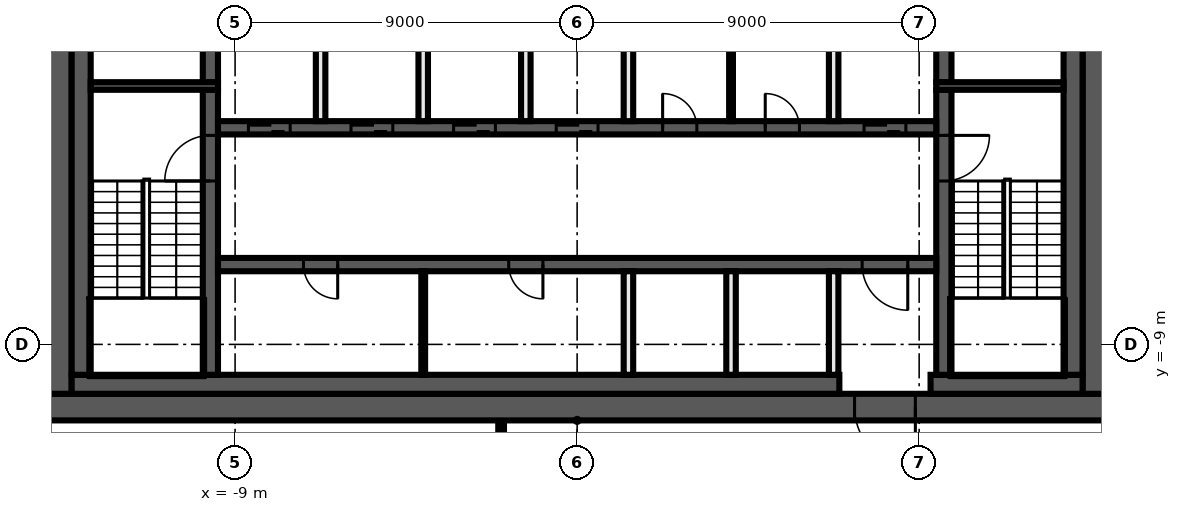
"""IFC4 building model, lengths in metres.
Left out: names, types, materials, properties, quantities, classifications, styles, units other than length and angle.
Written with IfcOpenShell. Run it as: python <this file> out.ifc"""

import sys

from ifc_helpers import new_model, si_unit, direction, frame, frame_2d, origin, place, context, subcontext, project, spatial, rectangle, extrude, element, fill, save


model = new_model("IFC4")
c1 = context("Model", 3, precision=1e-05, world=origin(), true_north=direction((0.0, 1.0)))
c2 = subcontext(c1, "Body", "Model", "MODEL_VIEW")
j1 = project(units=[si_unit("LENGTHUNIT", "METRE"), si_unit("PLANEANGLEUNIT", "RADIAN")], contexts=[c1])
p1 = place(None, origin())
s1 = spatial("IfcSite", under=j1, at=p1, CompositionType="ELEMENT")
p2 = place(p1, origin())
s2 = spatial("IfcBuilding", under=s1, at=p2, CompositionType="ELEMENT")
p3 = place(p2, frame((0.0, 0.0, 232.8)))
s3 = spatial("IfcBuildingStorey", under=s2, at=p3, CompositionType="ELEMENT", Elevation=232.8)
p4 = place(p3, frame((-2.0, -13.325, 0.0), z_axis=(0.0, 0.0, 1.0), x_axis=(0.0, 1.0, 0.0)))
e1 = element("IfcWall", 1, at=p4, inside=s3, PredefinedType="PARTITIONING", context=c2, shape_type="SweptSolid", body=[
    extrude(rectangle(XDim=2.325, YDim=0.15, at=frame_2d((1.163, 0.0))), origin(), (0.0, 0.0, 1.0), 3.75),
])
p5 = place(p3, frame((14.0, -10.65, 0.0), z_axis=(0.0, 0.0, 1.0), x_axis=(-1.0, 0.0, 0.0)))
e2 = element("IfcWall", 2, at=p5, inside=s3, PredefinedType="SHEAR", context=c2, shape_type="SweptSolid", body=[
    extrude(rectangle(XDim=28.0, YDim=0.7, at=frame_2d((14.0, 0.0))), origin(), (0.0, 0.0, 1.0), 3.75),
])
p6 = place(p5, frame((5.1, 0.0, 0.0)))
e3 = element("IfcOpeningElement", 3, at=p6, cuts=e2, PredefinedType="OPENING", context=c2, shape_type="SweptSolid", body=[
    extrude(rectangle(XDim=1.6, YDim=2.1, at=frame_2d((0.8, 1.05))), frame((0.0, 0.36, 0.0), z_axis=(0.0, -1.0, 0.0), x_axis=(1.0, 0.0, 0.0)), (0.0, 0.0, 1.0), 0.72),
])
for number, where, z_axis, x_axis in (
    (4, (13.65, 10.3, 0.0), (0.0, 0.0, 1.0), (0.0, -1.0, 0.0)),
    (5, (-13.65, -10.3, 0.0), (0.0, 0.0, 1.0), (0.0, 1.0, 0.0)),
):
    element("IfcWall", number, at=place(p3, frame(where, z_axis=z_axis, x_axis=x_axis)), inside=s3, PredefinedType="SHEAR", context=c2, shape_type="SweptSolid", body=[
        extrude(rectangle(XDim=20.6, YDim=0.7, at=frame_2d((10.3, 0.0))), origin(), (0.0, 0.0, 1.0), 3.75),
    ])
p7 = place(p3, frame((13.3, -10.05, 0.0), z_axis=(0.0, 0.0, 1.0), x_axis=(-1.0, 0.0, 0.0)))
e6 = element("IfcWall", 6, at=p7, inside=s3, PredefinedType="SHEAR", context=c2, shape_type="SweptSolid", body=[
    extrude(rectangle(XDim=4.0, YDim=0.5, at=frame_2d((2.0, 0.0))), origin(), (0.0, 0.0, 1.0), 3.75),
])
p8 = place(p3, frame((6.9, -10.05, 0.0), z_axis=(0.0, 0.0, 1.0), x_axis=(-1.0, 0.0, 0.0)))
e7 = element("IfcWall", 7, at=p8, inside=s3, PredefinedType="SHEAR", context=c2, shape_type="SweptSolid", body=[
    extrude(rectangle(XDim=20.2, YDim=0.5, at=frame_2d((10.1, 0.0))), origin(), (0.0, 0.0, 1.0), 3.75),
])
for number, where, z_axis, x_axis in (
    (8, (13.05, 9.8, 0.0), (0.0, 0.0, 1.0), (0.0, -1.0, 0.0)),
    (9, (-13.05, -9.8, 0.0), (0.0, 0.0, 1.0), (0.0, 1.0, 0.0)),
):
    element("IfcWall", number, at=place(p3, frame(where, z_axis=z_axis, x_axis=x_axis)), inside=s3, PredefinedType="SHEAR", context=c2, shape_type="SweptSolid", body=[
        extrude(rectangle(XDim=19.6, YDim=0.5, at=frame_2d((9.8, 0.0))), origin(), (0.0, 0.0, 1.0), 3.75),
    ])
p9 = place(p3, frame((9.65, -2.3, 0.0), z_axis=(0.0, 0.0, 1.0), x_axis=(0.0, -1.0, 0.0)))
e10 = element("IfcWall", 10, at=p9, inside=s3, PredefinedType="SHEAR", context=c2, shape_type="SweptSolid", body=[
    extrude(rectangle(XDim=7.5, YDim=0.4, at=frame_2d((3.75, 0.0))), origin(), (0.0, 0.0, 1.0), 3.75),
])
p10 = place(p9, frame((1.2, 0.0, 0.0)))
e11 = element("IfcOpeningElement", 11, at=p10, cuts=e10, PredefinedType="OPENING", context=c2, shape_type="SweptSolid", body=[
    extrude(rectangle(XDim=1.2, YDim=2.1, at=frame_2d((0.6, 1.05))), frame((0.0, 0.21, 0.0), z_axis=(0.0, -1.0, 0.0), x_axis=(1.0, 0.0, 0.0)), (0.0, 0.0, 1.0), 0.42),
])
p11 = place(p3, frame((9.65, 2.1, 0.0), z_axis=(0.0, 0.0, 1.0), x_axis=(0.0, -1.0, 0.0)))
e12 = element("IfcWall", 12, at=p11, inside=s3, PredefinedType="SHEAR", context=c2, shape_type="SweptSolid", body=[
    extrude(rectangle(XDim=4.2, YDim=0.4, at=frame_2d((2.1, 0.0))), origin(), (0.0, 0.0, 1.0), 3.75),
])
p12 = place(p11, frame((0.15, 0.0, 0.0)))
e13 = element("IfcOpeningElement", 13, at=p12, cuts=e12, PredefinedType="OPENING", context=c2, shape_type="SweptSolid", body=[
    extrude(rectangle(XDim=0.9, YDim=2.1, at=frame_2d((0.45, 1.05))), frame((0.0, 0.21, 0.0), z_axis=(0.0, -1.0, 0.0), x_axis=(1.0, 0.0, 0.0)), (0.0, 0.0, 1.0), 0.42),
])
p13 = place(p3, frame((-9.65, -9.8, 0.0), z_axis=(0.0, 0.0, 1.0), x_axis=(0.0, 1.0, 0.0)))
e14 = element("IfcWall", 14, at=p13, inside=s3, PredefinedType="SHEAR", context=c2, shape_type="SweptSolid", body=[
    extrude(rectangle(XDim=7.5, YDim=0.4, at=frame_2d((3.75, 0.0))), origin(), (0.0, 0.0, 1.0), 3.75),
])
p14 = place(p13, frame((5.1, 0.0, 0.0)))
e15 = element("IfcOpeningElement", 15, at=p14, cuts=e14, PredefinedType="OPENING", context=c2, shape_type="SweptSolid", body=[
    extrude(rectangle(XDim=1.2, YDim=2.1, at=frame_2d((0.6, 1.05))), frame((0.0, 0.21, 0.0), z_axis=(0.0, -1.0, 0.0), x_axis=(1.0, 0.0, 0.0)), (0.0, 0.0, 1.0), 0.42),
])
p15 = place(p3, frame((-9.65, -2.1, 0.0), z_axis=(0.0, 0.0, 1.0), x_axis=(0.0, 1.0, 0.0)))
e16 = element("IfcWall", 16, at=p15, inside=s3, PredefinedType="SHEAR", context=c2, shape_type="SweptSolid", body=[
    extrude(rectangle(XDim=4.2, YDim=0.4, at=frame_2d((2.1, 0.0))), origin(), (0.0, 0.0, 1.0), 3.75),
])
for number, where, z_axis, x_axis in (
    (17, (9.45, -2.2, 0.0), (0.0, 0.0, 1.0), (1.0, 0.0, 0.0)),
    (18, (-9.45, -2.2, 0.0), (0.0, 0.0, 1.0), (-1.0, 0.0, 0.0)),
):
    element("IfcWall", number, at=place(p3, frame(where, z_axis=z_axis, x_axis=x_axis)), inside=s3, PredefinedType="SHEAR", context=c2, shape_type="SweptSolid", body=[
        extrude(rectangle(XDim=3.35, YDim=0.2, at=frame_2d((1.675, 0.0))), origin(), (0.0, 0.0, 1.0), 3.75),
    ])
p16 = place(p3, frame((-9.45, -3.3, 0.0), z_axis=(0.0, 0.0, 1.0), x_axis=(1.0, 0.0, 0.0)))
e19 = element("IfcWall", 19, at=p16, inside=s3, PredefinedType="SHEAR", context=c2, shape_type="SweptSolid", body=[
    extrude(rectangle(XDim=18.9, YDim=0.35, at=frame_2d((9.45, 0.0))), origin(), (0.0, 0.0, 1.0), 3.75),
])
p17 = place(p16, frame((0.8, 0.0, 0.0)))
e20 = element("IfcOpeningElement", 20, at=p17, cuts=e19, PredefinedType="OPENING", context=c2, shape_type="SweptSolid", body=[
    extrude(rectangle(XDim=1.1, YDim=2.1, at=frame_2d((0.55, 1.05))), frame((0.0, 0.185, 0.0), z_axis=(0.0, -1.0, 0.0), x_axis=(1.0, 0.0, 0.0)), (0.0, 0.0, 1.0), 0.37),
])
p18 = place(p16, frame((3.5, 0.0, 0.0)))
e21 = element("IfcOpeningElement", 21, at=p18, cuts=e19, PredefinedType="OPENING", context=c2, shape_type="SweptSolid", body=[
    extrude(rectangle(XDim=1.1, YDim=2.1, at=frame_2d((0.55, 1.05))), frame((0.0, 0.185, 0.0), z_axis=(0.0, -1.0, 0.0), x_axis=(1.0, 0.0, 0.0)), (0.0, 0.0, 1.0), 0.37),
])
p19 = place(p16, frame((6.2, 0.0, 0.0)))
e22 = element("IfcOpeningElement", 22, at=p19, cuts=e19, PredefinedType="OPENING", context=c2, shape_type="SweptSolid", body=[
    extrude(rectangle(XDim=1.1, YDim=2.1, at=frame_2d((0.55, 1.05))), frame((0.0, 0.185, 0.0), z_axis=(0.0, -1.0, 0.0), x_axis=(1.0, 0.0, 0.0)), (0.0, 0.0, 1.0), 0.37),
])
p20 = place(p16, frame((8.9, 0.0, 0.0)))
e23 = element("IfcOpeningElement", 23, at=p20, cuts=e19, PredefinedType="OPENING", context=c2, shape_type="SweptSolid", body=[
    extrude(rectangle(XDim=1.1, YDim=2.1, at=frame_2d((0.55, 1.05))), frame((0.0, 0.185, 0.0), z_axis=(0.0, -1.0, 0.0), x_axis=(1.0, 0.0, 0.0)), (0.0, 0.0, 1.0), 0.37),
])
p21 = place(p16, frame((17.0, 0.0, 0.0)))
e24 = element("IfcOpeningElement", 24, at=p21, cuts=e19, PredefinedType="OPENING", context=c2, shape_type="SweptSolid", body=[
    extrude(rectangle(XDim=1.1, YDim=2.1, at=frame_2d((0.55, 1.05))), frame((0.0, 0.185, 0.0), z_axis=(0.0, -1.0, 0.0), x_axis=(1.0, 0.0, 0.0)), (0.0, 0.0, 1.0), 0.37),
])
p22 = place(p16, frame((11.7, 0.0, 0.0)))
e25 = element("IfcOpeningElement", 25, at=p22, cuts=e19, PredefinedType="OPENING", context=c2, shape_type="SweptSolid", body=[
    extrude(rectangle(XDim=0.9, YDim=2.1, at=frame_2d((0.45, 1.05))), frame((0.0, 0.185, 0.0), z_axis=(0.0, -1.0, 0.0), x_axis=(1.0, 0.0, 0.0)), (0.0, 0.0, 1.0), 0.37),
])
p23 = place(p16, frame((14.4, 0.0, 0.0)))
e26 = element("IfcOpeningElement", 26, at=p23, cuts=e19, PredefinedType="OPENING", context=c2, shape_type="SweptSolid", body=[
    extrude(rectangle(XDim=0.9, YDim=2.1, at=frame_2d((0.45, 1.05))), frame((0.0, 0.185, 0.0), z_axis=(0.0, -1.0, 0.0), x_axis=(1.0, 0.0, 0.0)), (0.0, 0.0, 1.0), 0.37),
])
p24 = place(p3, frame((9.45, -6.9, 0.0), z_axis=(0.0, 0.0, 1.0), x_axis=(-1.0, 0.0, 0.0)))
e27 = element("IfcWall", 27, at=p24, inside=s3, PredefinedType="SHEAR", context=c2, shape_type="SweptSolid", body=[
    extrude(rectangle(XDim=18.9, YDim=0.35, at=frame_2d((9.45, 0.0))), origin(), (0.0, 0.0, 1.0), 3.75),
])
p25 = place(p24, frame((0.75, 0.0, 0.0)))
e28 = element("IfcOpeningElement", 28, at=p25, cuts=e27, PredefinedType="OPENING", context=c2, shape_type="SweptSolid", body=[
    extrude(rectangle(XDim=1.2, YDim=2.1, at=frame_2d((0.6, 1.05))), frame((0.0, 0.185, 0.0), z_axis=(0.0, -1.0, 0.0), x_axis=(1.0, 0.0, 0.0)), (0.0, 0.0, 1.0), 0.37),
])
p26 = place(p24, frame((15.75, 0.0, 0.0)))
e29 = element("IfcOpeningElement", 29, at=p26, cuts=e27, PredefinedType="OPENING", context=c2, shape_type="SweptSolid", body=[
    extrude(rectangle(XDim=0.9, YDim=2.1, at=frame_2d((0.45, 1.05))), frame((0.0, 0.185, 0.0), z_axis=(0.0, -1.0, 0.0), x_axis=(1.0, 0.0, 0.0)), (0.0, 0.0, 1.0), 0.37),
])
p27 = place(p24, frame((10.35, 0.0, 0.0)))
e30 = element("IfcOpeningElement", 30, at=p27, cuts=e27, PredefinedType="OPENING", context=c2, shape_type="SweptSolid", body=[
    extrude(rectangle(XDim=0.9, YDim=2.1, at=frame_2d((0.45, 1.05))), frame((0.0, 0.185, 0.0), z_axis=(0.0, -1.0, 0.0), x_axis=(1.0, 0.0, 0.0)), (0.0, 0.0, 1.0), 0.37),
])
for number, where, z_axis, x_axis in (
    (31, (6.75, -9.8, 0.0), (0.0, 0.0, 1.0), (0.0, 1.0, 0.0)),
    (32, (6.75, -3.125, 0.0), (0.0, 0.0, 1.0), (0.0, 1.0, 0.0)),
):
    element("IfcWall", number, at=place(p3, frame(where, z_axis=z_axis, x_axis=x_axis)), inside=s3, PredefinedType="SOLIDWALL", context=c2, shape_type="SweptSolid", body=[
        extrude(rectangle(XDim=2.725, YDim=0.25, at=frame_2d((1.363, 0.0))), origin(), (0.0, 0.0, 1.0), 3.75),
    ])
p28 = place(p3, frame((4.05, -3.125, 0.0), z_axis=(0.0, 0.0, 1.0), x_axis=(0.0, 1.0, 0.0)))
e33 = element("IfcWall", 33, at=p28, inside=s3, PredefinedType="PARTITIONING", context=c2, shape_type="SweptSolid", body=[
    extrude(rectangle(XDim=2.725, YDim=0.1, at=frame_2d((1.363, 0.0))), origin(), (0.0, 0.0, 1.0), 3.75),
])
for number, where, z_axis, x_axis in (
    (34, (4.05, -9.8, 0.0), (0.0, 0.0, 1.0), (0.0, 1.0, 0.0)),
    (35, (1.35, -9.8, 0.0), (0.0, 0.0, 1.0), (0.0, 1.0, 0.0)),
    (36, (1.35, -3.125, 0.0), (0.0, 0.0, 1.0), (0.0, 1.0, 0.0)),
    (37, (-1.35, -3.125, 0.0), (0.0, 0.0, 1.0), (0.0, 1.0, 0.0)),
):
    element("IfcWall", number, at=place(p3, frame(where, z_axis=z_axis, x_axis=x_axis)), inside=s3, PredefinedType="SOLIDWALL", context=c2, shape_type="SweptSolid", body=[
        extrude(rectangle(XDim=2.725, YDim=0.25, at=frame_2d((1.363, 0.0))), origin(), (0.0, 0.0, 1.0), 3.75),
    ])
p29 = place(p3, frame((-4.05, -9.8, 0.0), z_axis=(0.0, 0.0, 1.0), x_axis=(0.0, 1.0, 0.0)))
e38 = element("IfcWall", 38, at=p29, inside=s3, PredefinedType="PARTITIONING", context=c2, shape_type="SweptSolid", body=[
    extrude(rectangle(XDim=2.725, YDim=0.1, at=frame_2d((1.363, 0.0))), origin(), (0.0, 0.0, 1.0), 3.75),
])
for number, where, z_axis, x_axis in (
    (39, (-4.05, -3.125, 0.0), (0.0, 0.0, 1.0), (0.0, 1.0, 0.0)),
    (40, (-6.75, -3.125, 0.0), (0.0, 0.0, 1.0), (0.0, 1.0, 0.0)),
):
    element("IfcWall", number, at=place(p3, frame(where, z_axis=z_axis, x_axis=x_axis)), inside=s3, PredefinedType="SOLIDWALL", context=c2, shape_type="SweptSolid", body=[
        extrude(rectangle(XDim=2.725, YDim=0.25, at=frame_2d((1.363, 0.0))), origin(), (0.0, 0.0, 1.0), 3.75),
    ])
p30 = place(p17, origin())
e41 = element("IfcDoor", 41, at=p30, inside=s3, OperationType="DOUBLE_DOOR_SLIDING", PredefinedType="DOOR", context=c2, shape_type="SweptSolid", body=[
    extrude(rectangle(XDim=1.1, YDim=2.1, at=frame_2d((0.55, 1.05))), frame((0.0, 0.025, 0.0), z_axis=(0.0, -1.0, 0.0), x_axis=(1.0, 0.0, 0.0)), (0.0, 0.0, 1.0), 0.05),
])
fill(e20, e41)
p31 = place(p18, origin())
e42 = element("IfcDoor", 42, at=p31, inside=s3, OperationType="DOUBLE_DOOR_SLIDING", PredefinedType="DOOR", context=c2, shape_type="SweptSolid", body=[
    extrude(rectangle(XDim=1.1, YDim=2.1, at=frame_2d((0.55, 1.05))), frame((0.0, 0.025, 0.0), z_axis=(0.0, -1.0, 0.0), x_axis=(1.0, 0.0, 0.0)), (0.0, 0.0, 1.0), 0.05),
])
fill(e21, e42)
p32 = place(p19, origin())
e43 = element("IfcDoor", 43, at=p32, inside=s3, OperationType="DOUBLE_DOOR_SLIDING", PredefinedType="DOOR", context=c2, shape_type="SweptSolid", body=[
    extrude(rectangle(XDim=1.1, YDim=2.1, at=frame_2d((0.55, 1.05))), frame((0.0, 0.025, 0.0), z_axis=(0.0, -1.0, 0.0), x_axis=(1.0, 0.0, 0.0)), (0.0, 0.0, 1.0), 0.05),
])
fill(e22, e43)
p33 = place(p20, origin())
e44 = element("IfcDoor", 44, at=p33, inside=s3, OperationType="DOUBLE_DOOR_SLIDING", PredefinedType="DOOR", context=c2, shape_type="SweptSolid", body=[
    extrude(rectangle(XDim=1.1, YDim=2.1, at=frame_2d((0.55, 1.05))), frame((0.0, 0.025, 0.0), z_axis=(0.0, -1.0, 0.0), x_axis=(1.0, 0.0, 0.0)), (0.0, 0.0, 1.0), 0.05),
])
fill(e23, e44)
p34 = place(p21, origin())
e45 = element("IfcDoor", 45, at=p34, inside=s3, OperationType="DOUBLE_DOOR_SLIDING", PredefinedType="DOOR", context=c2, shape_type="SweptSolid", body=[
    extrude(rectangle(XDim=1.1, YDim=2.1, at=frame_2d((0.55, 1.05))), frame((0.0, 0.025, 0.0), z_axis=(0.0, -1.0, 0.0), x_axis=(1.0, 0.0, 0.0)), (0.0, 0.0, 1.0), 0.05),
])
fill(e24, e45)
p35 = place(p6, origin())
e46 = element("IfcDoor", 46, at=p35, inside=s3, OperationType="DOUBLE_DOOR_SINGLE_SWING", PredefinedType="DOOR", context=c2, shape_type="SweptSolid", body=[
    extrude(rectangle(XDim=1.6, YDim=2.1, at=frame_2d((0.8, 1.05))), frame((0.0, 0.025, 0.0), z_axis=(0.0, -1.0, 0.0), x_axis=(1.0, 0.0, 0.0)), (0.0, 0.0, 1.0), 0.05),
])
fill(e3, e46)
p36 = place(p25, origin())
e47 = element("IfcDoor", 47, at=p36, inside=s3, OperationType="SINGLE_SWING_LEFT", PredefinedType="DOOR", context=c2, shape_type="SweptSolid", body=[
    extrude(rectangle(XDim=1.2, YDim=2.1, at=frame_2d((0.6, 1.05))), frame((0.0, 0.025, 0.0), z_axis=(0.0, -1.0, 0.0), x_axis=(1.0, 0.0, 0.0)), (0.0, 0.0, 1.0), 0.05),
])
fill(e28, e47)
p37 = place(p22, origin())
e48 = element("IfcDoor", 48, at=p37, inside=s3, OperationType="SINGLE_SWING_RIGHT", PredefinedType="DOOR", context=c2, shape_type="SweptSolid", body=[
    extrude(rectangle(XDim=0.9, YDim=2.1, at=frame_2d((0.45, 1.05))), frame((0.0, 0.025, 0.0), z_axis=(0.0, -1.0, 0.0), x_axis=(1.0, 0.0, 0.0)), (0.0, 0.0, 1.0), 0.05),
])
fill(e25, e48)
p38 = place(p23, origin())
e49 = element("IfcDoor", 49, at=p38, inside=s3, OperationType="SINGLE_SWING_LEFT", PredefinedType="DOOR", context=c2, shape_type="SweptSolid", body=[
    extrude(rectangle(XDim=0.9, YDim=2.1, at=frame_2d((0.45, 1.05))), frame((0.0, 0.025, 0.0), z_axis=(0.0, -1.0, 0.0), x_axis=(1.0, 0.0, 0.0)), (0.0, 0.0, 1.0), 0.05),
])
fill(e26, e49)
p39 = place(p26, origin())
e50 = element("IfcDoor", 50, at=p39, inside=s3, OperationType="SINGLE_SWING_RIGHT", PredefinedType="DOOR", context=c2, shape_type="SweptSolid", body=[
    extrude(rectangle(XDim=0.9, YDim=2.1, at=frame_2d((0.45, 1.05))), frame((0.0, 0.025, 0.0), z_axis=(0.0, -1.0, 0.0), x_axis=(1.0, 0.0, 0.0)), (0.0, 0.0, 1.0), 0.05),
])
fill(e29, e50)
p40 = place(p27, origin())
e51 = element("IfcDoor", 51, at=p40, inside=s3, OperationType="SINGLE_SWING_LEFT", PredefinedType="DOOR", context=c2, shape_type="SweptSolid", body=[
    extrude(rectangle(XDim=0.9, YDim=2.1, at=frame_2d((0.45, 1.05))), frame((0.0, 0.025, 0.0), z_axis=(0.0, -1.0, 0.0), x_axis=(1.0, 0.0, 0.0)), (0.0, 0.0, 1.0), 0.05),
])
fill(e30, e51)
p41 = place(p10, origin())
e52 = element("IfcDoor", 52, at=p41, inside=s3, OperationType="SINGLE_SWING_RIGHT", PredefinedType="DOOR", context=c2, shape_type="SweptSolid", body=[
    extrude(rectangle(XDim=1.2, YDim=2.1, at=frame_2d((0.6, 1.05))), frame((0.0, 0.025, 0.0), z_axis=(0.0, -1.0, 0.0), x_axis=(1.0, 0.0, 0.0)), (0.0, 0.0, 1.0), 0.05),
])
fill(e11, e52)
p42 = place(p14, origin())
e53 = element("IfcDoor", 53, at=p42, inside=s3, OperationType="SINGLE_SWING_LEFT", PredefinedType="DOOR", context=c2, shape_type="SweptSolid", body=[
    extrude(rectangle(XDim=1.2, YDim=2.1, at=frame_2d((0.6, 1.05))), frame((0.0, 0.025, 0.0), z_axis=(0.0, -1.0, 0.0), x_axis=(1.0, 0.0, 0.0)), (0.0, 0.0, 1.0), 0.05),
])
fill(e15, e53)
save(model, sys.argv[1])
